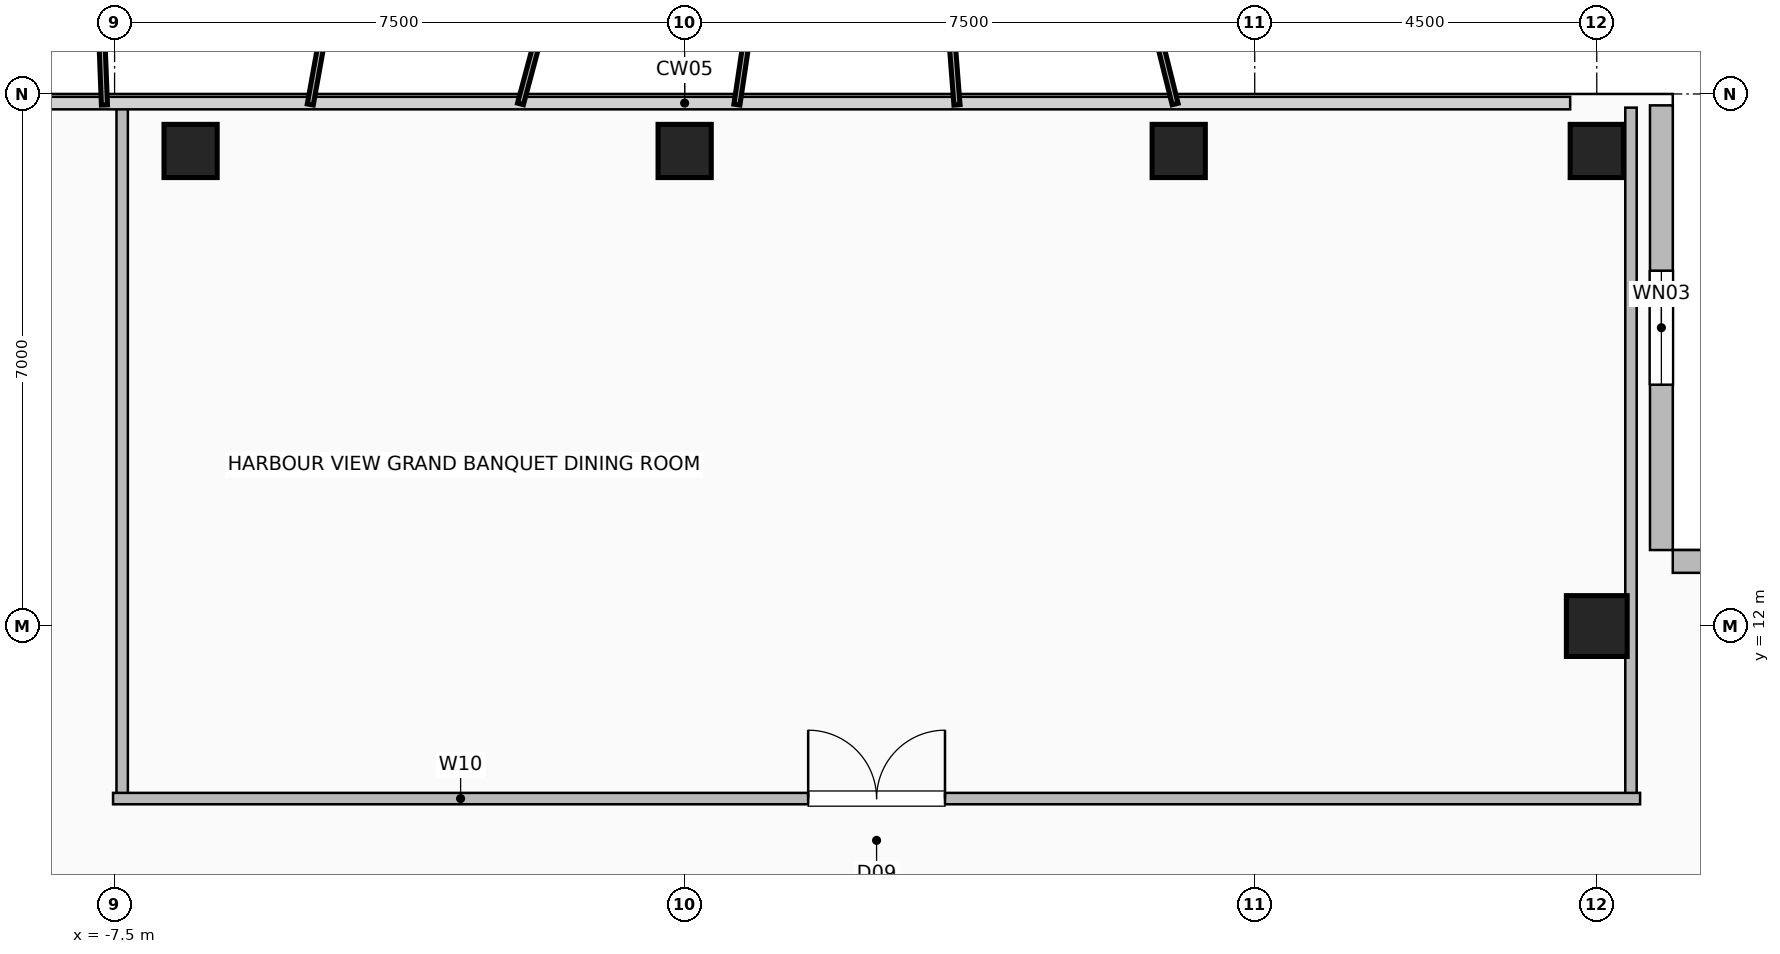
"""IFC4 building model, lengths in metres.
Left out: names, types, materials, properties, quantities, classifications, styles, units other than length and angle.
Written with IfcOpenShell. Run it as: python <this file> out.ifc"""

import sys

from ifc_helpers import new_model, si_unit, direction, frame, frame_2d, origin, origin_2d, place, context, subcontext, project, spatial, rectangle, hollow_rectangle, extrude, element, fill, save


model = new_model("IFC4")
c1 = context("Model", 3, precision=1e-05, world=origin(), true_north=direction((0.0, 1.0)))
c2 = subcontext(c1, "Body", "Model", "MODEL_VIEW")
j1 = project(units=[si_unit("LENGTHUNIT", "METRE"), si_unit("PLANEANGLEUNIT", "RADIAN")], contexts=[c1])
p1 = place(None, origin())
s1 = spatial("IfcSite", under=j1, at=p1, CompositionType="ELEMENT")
p2 = place(p1, origin())
s2 = spatial("IfcBuilding", under=s1, at=p2, CompositionType="ELEMENT")
p3 = place(p2, frame((0.0, 0.0, 293.6)))
s3 = spatial("IfcBuildingStorey", under=s2, at=p3, CompositionType="ELEMENT", Elevation=293.6)
for number, where, z_axis, x_axis in (
    (1, (-6.5, 18.25, 0.0), (0.0, 0.0, 1.0), (1.0, 0.0, 0.0)),
    (2, (0.0, 18.25, 0.0), (0.0, 0.0, 1.0), (1.0, 0.0, 0.0)),
    (3, (6.5, 18.25, 0.0), (0.0, 0.0, 1.0), (1.0, 0.0, 0.0)),
    (4, (12.0, 18.25, 0.0), (0.0, 0.0, 1.0), (1.0, 0.0, 0.0)),
):
    element("IfcColumn", number, at=place(p3, frame(where, z_axis=z_axis, x_axis=x_axis)), inside=s3, PredefinedType="COLUMN", context=c2, shape_type="SweptSolid", body=[
        extrude(hollow_rectangle(XDim=0.7, YDim=0.7, WallThickness=0.035, at=origin_2d()), origin(), (0.0, 0.0, 1.0), 3.6),
    ])
p4 = place(p3, frame((12.0, 12.0, 0.0), z_axis=(0.0, 0.0, 1.0), x_axis=(1.0, 0.0, 0.0)))
e5 = element("IfcColumn", 5, at=p4, inside=s3, PredefinedType="COLUMN", context=c2, shape_type="SweptSolid", body=[
    extrude(hollow_rectangle(XDim=0.8, YDim=0.8, WallThickness=0.04, at=origin_2d()), origin(), (0.0, 0.0, 1.0), 3.6),
])
p5 = place(p3, frame((12.85, 18.85, 0.0), z_axis=(0.0, 0.0, 1.0), x_axis=(0.0, -1.0, 0.0)))
e6 = element("IfcWall", 6, at=p5, inside=s3, PredefinedType="SOLIDWALL", context=c2, shape_type="SweptSolid", body=[
    extrude(rectangle(XDim=5.85, YDim=0.3, at=frame_2d((2.925, 0.0))), origin(), (0.0, 0.0, 1.0), 3.36),
])
p6 = place(p5, frame((2.175, 0.0, 0.9)))
e7 = element("IfcOpeningElement", 7, at=p6, cuts=e6, PredefinedType="OPENING", context=c2, shape_type="SweptSolid", body=[
    extrude(rectangle(XDim=1.5, YDim=1.8, at=frame_2d((0.75, 0.9))), frame((0.0, 0.16, 0.0), z_axis=(0.0, -1.0, 0.0), x_axis=(1.0, 0.0, 0.0)), (0.0, 0.0, 1.0), 0.32),
])
p7 = place(p3, frame((18.85, 12.85, 0.0), z_axis=(0.0, 0.0, 1.0), x_axis=(-1.0, 0.0, 0.0)))
e8 = element("IfcWall", 8, at=p7, inside=s3, PredefinedType="SOLIDWALL", context=c2, shape_type="SweptSolid", body=[
    extrude(rectangle(XDim=5.85, YDim=0.3, at=frame_2d((2.925, 0.0))), origin(), (0.0, 0.0, 1.0), 3.36),
])
for number, where, z_axis, x_axis in (
    (9, (-7.4, 9.73, 0.0), (0.0, 0.0, 1.0), (0.0, 1.0, 0.0)),
    (10, (12.45, 9.73, 0.0), (0.0, 0.0, 1.0), (0.0, 1.0, 0.0)),
):
    element("IfcWall", number, at=place(p3, frame(where, z_axis=z_axis, x_axis=x_axis)), inside=s3, PredefinedType="PARTITIONING", context=c2, shape_type="SweptSolid", body=[
        extrude(rectangle(XDim=9.09, YDim=0.15, at=frame_2d((4.545, 0.0))), origin(), (0.0, 0.0, 1.0), 3.36),
    ])
p8 = place(p3, frame((-7.52, 9.73, 0.0), z_axis=(0.0, 0.0, 1.0), x_axis=(1.0, 0.0, 0.0)))
e11 = element("IfcWall", 11, at=p8, inside=s3, PredefinedType="PARTITIONING", context=c2, shape_type="SweptSolid", body=[
    extrude(rectangle(XDim=20.09, YDim=0.15, at=frame_2d((10.045, 0.0))), origin(), (0.0, 0.0, 1.0), 3.36),
])
p9 = place(p8, frame((9.145, 0.0, 0.0)))
e12 = element("IfcOpeningElement", 12, at=p9, cuts=e11, PredefinedType="OPENING", context=c2, shape_type="SweptSolid", body=[
    extrude(rectangle(XDim=1.8, YDim=2.08, at=frame_2d((0.9, 1.04))), frame((0.0, 0.085, 0.0), z_axis=(0.0, -1.0, 0.0), x_axis=(1.0, 0.0, 0.0)), (0.0, 0.0, 1.0), 0.17),
])
p10 = place(p6, origin())
e13 = element("IfcWindow", 13, at=p10, inside=s3, PartitioningType="SINGLE_PANEL", PredefinedType="WINDOW", context=c2, shape_type="SweptSolid", body=[
    extrude(rectangle(XDim=1.5, YDim=1.8, at=frame_2d((0.75, 0.9))), frame((0.0, 0.03, 0.0), z_axis=(0.0, -1.0, 0.0), x_axis=(1.0, 0.0, 0.0)), (0.0, 0.0, 1.0), 0.06),
])
fill(e7, e13)
p11 = place(p9, origin())
e14 = element("IfcDoor", 14, at=p11, inside=s3, OperationType="DOUBLE_DOOR_SINGLE_SWING", PredefinedType="DOOR", context=c2, shape_type="SweptSolid", body=[
    extrude(rectangle(XDim=1.8, YDim=2.08, at=frame_2d((0.9, 1.04))), frame((0.0, 0.025, 0.0), z_axis=(0.0, -1.0, 0.0), x_axis=(1.0, 0.0, 0.0)), (0.0, 0.0, 1.0), 0.05),
])
fill(e12, e14)
save(model, sys.argv[1])
